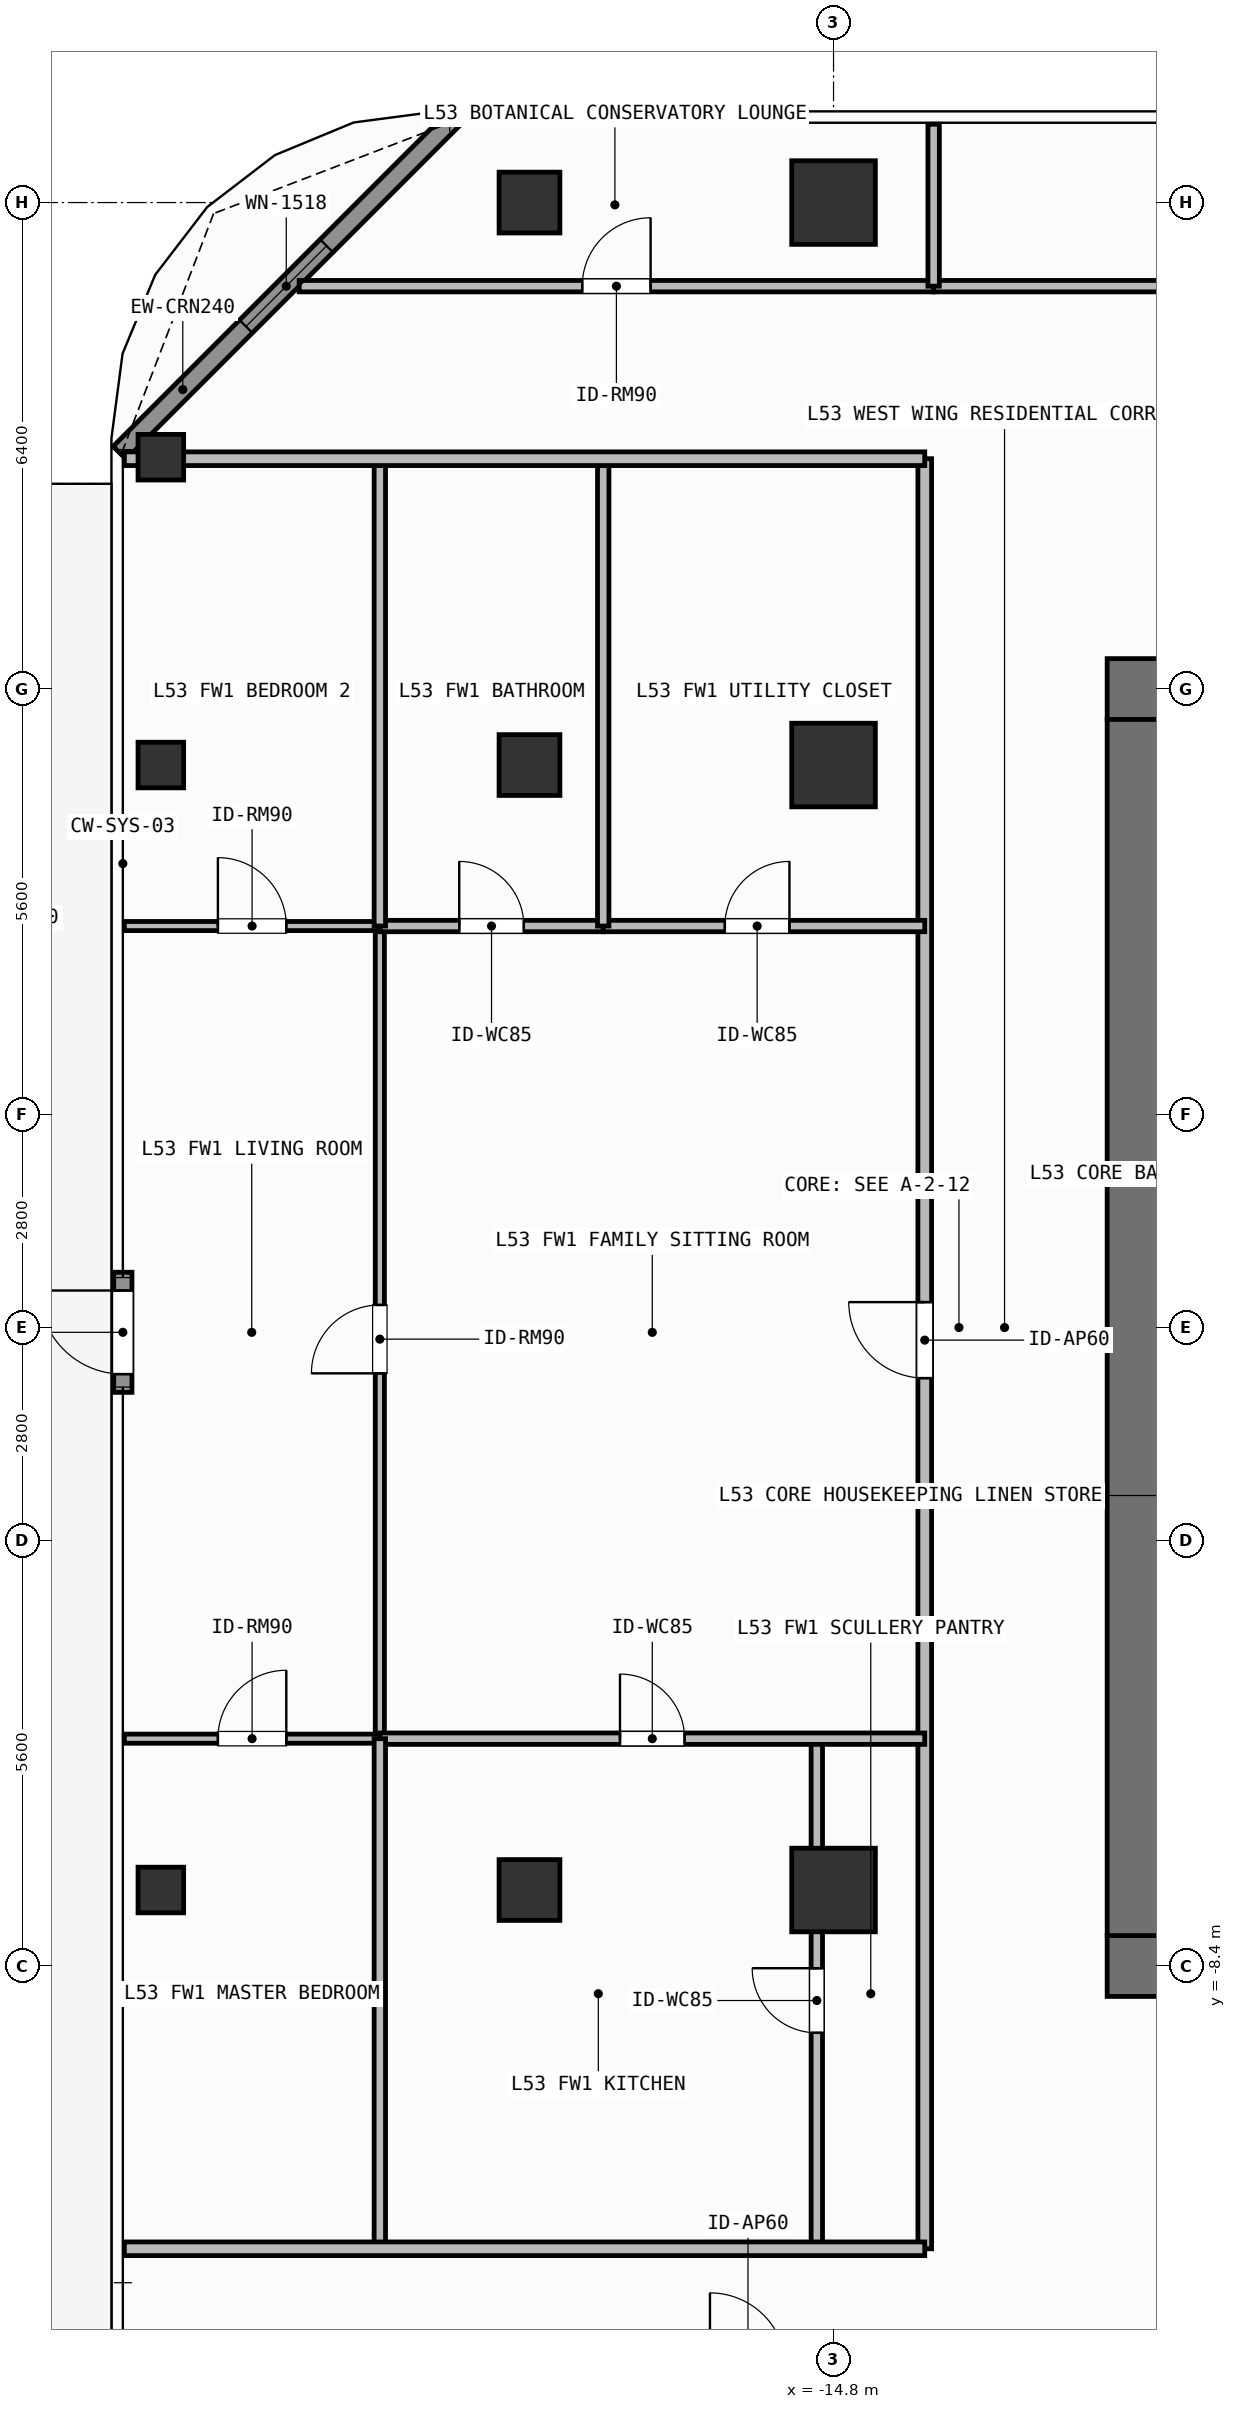
"""IFC4 building model, lengths in metres.
Left out: names, types, materials, properties, quantities, classifications, styles, units other than length and angle.
Written with IfcOpenShell. Run it as: python <this file> out.ifc"""

import sys

from ifc_helpers import new_model, si_unit, direction, frame, frame_2d, origin, origin_2d, place, context, subcontext, project, spatial, rectangle, hollow_rectangle, extrude, element, fill, save


model = new_model("IFC4")
c1 = context("Model", 3, precision=1e-05, world=origin(), true_north=direction((0.0, 1.0)))
c2 = subcontext(c1, "Body", "Model", "MODEL_VIEW")
j1 = project(units=[si_unit("LENGTHUNIT", "METRE"), si_unit("PLANEANGLEUNIT", "RADIAN")], contexts=[c1])
p1 = place(None, origin())
s1 = spatial("IfcSite", under=j1, at=p1, CompositionType="ELEMENT")
p2 = place(p1, origin())
s2 = spatial("IfcBuilding", under=s1, at=p2, CompositionType="ELEMENT")
p3 = place(p2, frame((0.0, 0.0, 215.7)))
s3 = spatial("IfcBuildingStorey", under=s2, at=p3, CompositionType="ELEMENT", Elevation=215.7)
for number, where, z_axis, x_axis in (
    (1, (-11.2, -8.4, 0.0), (0.0, 0.0, 1.0), (1.0, 0.0, 0.0)),
    (2, (-11.2, 8.4, 0.0), (0.0, 0.0, 1.0), (1.0, 0.0, 0.0)),
):
    element("IfcWall", number, at=place(p3, frame(where, z_axis=z_axis, x_axis=x_axis)), inside=s3, PredefinedType="SHEAR", context=c2, shape_type="SweptSolid", body=[
        extrude(rectangle(XDim=1.5, YDim=0.8, at=frame_2d((0.75, 0.0))), origin(), (0.0, 0.0, 1.0), 3.9),
    ])
p4 = place(p3, frame((-10.8, -8.0, 0.0), z_axis=(0.0, 0.0, 1.0), x_axis=(0.0, 1.0, 0.0)))
e3 = element("IfcWall", 3, at=p4, inside=s3, PredefinedType="SHEAR", context=c2, shape_type="SweptSolid", body=[
    extrude(rectangle(XDim=16.0, YDim=0.8, at=frame_2d((8.0, 0.0))), origin(), (0.0, 0.0, 1.0), 3.9),
])
for number, where, z_axis, x_axis in (
    (4, (-14.8, 14.8, 0.0), (0.0, 0.0, 1.0), (1.0, 0.0, 0.0)),
    (5, (-14.8, -7.4, 0.0), (0.0, 0.0, 1.0), (1.0, 0.0, 0.0)),
    (6, (-14.8, 7.4, 0.0), (0.0, 0.0, 1.0), (1.0, 0.0, 0.0)),
):
    element("IfcColumn", number, at=place(p3, frame(where, z_axis=z_axis, x_axis=x_axis)), inside=s3, PredefinedType="COLUMN", context=c2, shape_type="SweptSolid", body=[
        extrude(rectangle(XDim=1.1, YDim=1.1, at=origin_2d()), origin(), (0.0, 0.0, 1.0), 3.9),
    ])
for number, where, z_axis, x_axis in (
    (7, (-18.8, -7.4, 0.0), (0.0, 0.0, 1.0), (1.0, 0.0, 0.0)),
    (8, (-18.8, 7.4, 0.0), (0.0, 0.0, 1.0), (1.0, 0.0, 0.0)),
    (9, (-18.8, 14.8, 0.0), (0.0, 0.0, 1.0), (1.0, 0.0, 0.0)),
):
    element("IfcColumn", number, at=place(p3, frame(where, z_axis=z_axis, x_axis=x_axis)), inside=s3, PredefinedType="COLUMN", context=c2, shape_type="SweptSolid", body=[
        extrude(hollow_rectangle(XDim=0.8, YDim=0.8, WallThickness=0.036, at=origin_2d()), origin(), (0.0, 0.0, 1.0), 3.9),
    ])
for number, where, z_axis, x_axis in (
    (10, (-23.65, 11.45, 0.0), (0.0, 0.0, 1.0), (1.0, 0.0, 0.0)),
    (11, (-23.65, -7.4, 0.0), (0.0, 0.0, 1.0), (1.0, 0.0, 0.0)),
    (12, (-23.65, 7.4, 0.0), (0.0, 0.0, 1.0), (1.0, 0.0, 0.0)),
):
    element("IfcColumn", number, at=place(p3, frame(where, z_axis=z_axis, x_axis=x_axis)), inside=s3, PredefinedType="COLUMN", context=c2, shape_type="SweptSolid", body=[
        extrude(hollow_rectangle(XDim=0.6, YDim=0.6, WallThickness=0.028, at=origin_2d()), origin(), (0.0, 0.0, 1.0), 3.9),
    ])
p5 = place(p3, frame((-24.15, -0.853, 0.0), z_axis=(0.0, 0.0, 1.0), x_axis=(0.0, 1.0, 0.0)))
e13 = element("IfcWall", 13, at=p5, inside=s3, PredefinedType="SOLIDWALL", context=c2, shape_type="SweptSolid", body=[
    extrude(rectangle(XDim=1.58, YDim=0.24, at=frame_2d((0.79, 0.0))), origin(), (0.0, 0.0, 1.0), 3.62),
])
p6 = place(p5, frame((0.24, 0.0, 0.0)))
e14 = element("IfcOpeningElement", 14, at=p6, cuts=e13, PredefinedType="OPENING", context=c2, shape_type="SweptSolid", body=[
    extrude(rectangle(XDim=1.1, YDim=2.2, at=frame_2d((0.55, 1.1))), frame((0.0, 0.13, 0.0), z_axis=(0.0, -1.0, 0.0), x_axis=(1.0, 0.0, 0.0)), (0.0, 0.0, 1.0), 0.26),
])
p7 = place(p3, frame((-24.192, 11.508, 0.0), z_axis=(0.0, 0.0, 1.0), x_axis=(0.707106781187, 0.707106781187, 0.0)))
e15 = element("IfcWall", 15, at=p7, inside=s3, PredefinedType="SOLIDWALL", context=c2, shape_type="SweptSolid", body=[
    extrude(rectangle(XDim=6.201, YDim=0.24, at=frame_2d((3.101, 0.0))), origin(), (0.0, 0.0, 1.0), 3.62),
])
p8 = place(p7, frame((2.351, 0.0, 0.8)))
e16 = element("IfcOpeningElement", 16, at=p8, cuts=e15, PredefinedType="OPENING", context=c2, shape_type="SweptSolid", body=[
    extrude(rectangle(XDim=1.5, YDim=1.85, at=frame_2d((0.75, 0.925))), frame((0.0, 0.13, 0.0), z_axis=(0.0, -1.0, 0.0), x_axis=(1.0, 0.0, 0.0)), (0.0, 0.0, 1.0), 0.26),
])
p9 = place(p3, frame((-21.83, 13.7, 0.0), z_axis=(0.0, 0.0, 1.0), x_axis=(1.0, 0.0, 0.0)))
e17 = element("IfcWall", 17, at=p9, inside=s3, PredefinedType="PARTITIONING", context=c2, shape_type="SweptSolid", body=[
    extrude(rectangle(XDim=8.347, YDim=0.15, at=frame_2d((4.174, 0.0))), origin(), (0.0, 0.0, 1.0), 3.62),
])
p10 = place(p9, frame((3.723, 0.0, 0.0)))
e18 = element("IfcOpeningElement", 18, at=p10, cuts=e17, PredefinedType="OPENING", context=c2, shape_type="SweptSolid", body=[
    extrude(rectangle(XDim=0.9, YDim=2.1, at=frame_2d((0.45, 1.05))), frame((0.0, 0.085, 0.0), z_axis=(0.0, -1.0, 0.0), x_axis=(1.0, 0.0, 0.0)), (0.0, 0.0, 1.0), 0.17),
])
p11 = place(p3, frame((-13.483, 13.7, 0.0), z_axis=(0.0, 0.0, 1.0), x_axis=(1.0, 0.0, 0.0)))
e19 = element("IfcWall", 19, at=p11, inside=s3, PredefinedType="PARTITIONING", context=c2, shape_type="SweptSolid", body=[
    extrude(rectangle(XDim=13.58, YDim=0.15, at=frame_2d((6.79, 0.0))), origin(), (0.0, 0.0, 1.0), 3.62),
])
p12 = place(p11, frame((6.788, 0.0, 0.0)))
e20 = element("IfcOpeningElement", 20, at=p12, cuts=e19, PredefinedType="OPENING", context=c2, shape_type="SweptSolid", body=[
    extrude(rectangle(XDim=0.9, YDim=2.1, at=frame_2d((0.45, 1.05))), frame((0.0, 0.085, 0.0), z_axis=(0.0, -1.0, 0.0), x_axis=(1.0, 0.0, 0.0)), (0.0, 0.0, 1.0), 0.17),
])
p13 = place(p3, frame((-13.6, -12.12, 0.0), z_axis=(0.0, 0.0, 1.0), x_axis=(0.0, 1.0, 0.0)))
e21 = element("IfcWall", 21, at=p13, inside=s3, PredefinedType="PARTITIONING", context=c2, shape_type="SweptSolid", body=[
    extrude(rectangle(XDim=23.55, YDim=0.18, at=frame_2d((11.775, 0.0))), origin(), (0.0, 0.0, 1.0), 3.62),
])
p14 = place(p13, frame((11.454, 0.0, 0.0)))
e22 = element("IfcOpeningElement", 22, at=p14, cuts=e21, PredefinedType="OPENING", context=c2, shape_type="SweptSolid", body=[
    extrude(rectangle(XDim=1.0, YDim=2.2, at=frame_2d((0.5, 1.1))), frame((0.0, 0.1, 0.0), z_axis=(0.0, -1.0, 0.0), x_axis=(1.0, 0.0, 0.0)), (0.0, 0.0, 1.0), 0.2),
])
p15 = place(p3, frame((-20.769, -5.409, 0.0), z_axis=(0.0, 0.0, 1.0), x_axis=(0.0, 1.0, 0.0)))
e23 = element("IfcWall", 23, at=p15, inside=s3, PredefinedType="PARTITIONING", context=c2, shape_type="SweptSolid", body=[
    extrude(rectangle(XDim=10.691, YDim=0.12, at=frame_2d((5.345, 0.0))), origin(), (0.0, 0.0, 1.0), 3.62),
])
p16 = place(p15, frame((4.806, 0.0, 0.0)))
e24 = element("IfcOpeningElement", 24, at=p16, cuts=e23, PredefinedType="OPENING", context=c2, shape_type="SweptSolid", body=[
    extrude(rectangle(XDim=0.9, YDim=2.1, at=frame_2d((0.45, 1.05))), frame((0.0, 0.07, 0.0), z_axis=(0.0, -1.0, 0.0), x_axis=(1.0, 0.0, 0.0)), (0.0, 0.0, 1.0), 0.14),
])
p17 = place(p3, frame((-15.02, -12.12, 0.0), z_axis=(0.0, 0.0, 1.0), x_axis=(0.0, 1.0, 0.0)))
e25 = element("IfcWall", 25, at=p17, inside=s3, PredefinedType="PARTITIONING", context=c2, shape_type="SweptSolid", body=[
    extrude(rectangle(XDim=6.711, YDim=0.15, at=frame_2d((3.355, 0.0))), origin(), (0.0, 0.0, 1.0), 3.62),
])
p18 = place(p17, frame((2.841, 0.0, 0.0)))
e26 = element("IfcOpeningElement", 26, at=p18, cuts=e25, PredefinedType="OPENING", context=c2, shape_type="SweptSolid", body=[
    extrude(rectangle(XDim=0.85, YDim=2.1, at=frame_2d((0.425, 1.05))), frame((0.0, 0.085, 0.0), z_axis=(0.0, -1.0, 0.0), x_axis=(1.0, 0.0, 0.0)), (0.0, 0.0, 1.0), 0.17),
])
p19 = place(p3, frame((-20.769, 5.282, 0.0), z_axis=(0.0, 0.0, 1.0), x_axis=(1.0, 0.0, 0.0)))
e27 = element("IfcWall", 27, at=p19, inside=s3, PredefinedType="PARTITIONING", context=c2, shape_type="SweptSolid", body=[
    extrude(rectangle(XDim=2.939, YDim=0.15, at=frame_2d((1.469, 0.0))), origin(), (0.0, 0.0, 1.0), 3.62),
])
p20 = place(p19, frame((1.044, 0.0, 0.0)))
e28 = element("IfcOpeningElement", 28, at=p20, cuts=e27, PredefinedType="OPENING", context=c2, shape_type="SweptSolid", body=[
    extrude(rectangle(XDim=0.85, YDim=2.1, at=frame_2d((0.425, 1.05))), frame((0.0, 0.085, 0.0), z_axis=(0.0, -1.0, 0.0), x_axis=(1.0, 0.0, 0.0)), (0.0, 0.0, 1.0), 0.17),
])
p21 = place(p3, frame((-17.83, 5.282, 0.0), z_axis=(0.0, 0.0, 1.0), x_axis=(1.0, 0.0, 0.0)))
e29 = element("IfcWall", 29, at=p21, inside=s3, PredefinedType="PARTITIONING", context=c2, shape_type="SweptSolid", body=[
    extrude(rectangle(XDim=4.23, YDim=0.15, at=frame_2d((2.115, 0.0))), origin(), (0.0, 0.0, 1.0), 3.62),
])
p22 = place(p21, frame((1.6, 0.0, 0.0)))
e30 = element("IfcOpeningElement", 30, at=p22, cuts=e29, PredefinedType="OPENING", context=c2, shape_type="SweptSolid", body=[
    extrude(rectangle(XDim=0.85, YDim=2.1, at=frame_2d((0.425, 1.05))), frame((0.0, 0.085, 0.0), z_axis=(0.0, -1.0, 0.0), x_axis=(1.0, 0.0, 0.0)), (0.0, 0.0, 1.0), 0.17),
])
p23 = place(p3, frame((-20.769, -5.409, 0.0), z_axis=(0.0, 0.0, 1.0), x_axis=(1.0, 0.0, 0.0)))
e31 = element("IfcWall", 31, at=p23, inside=s3, PredefinedType="PARTITIONING", context=c2, shape_type="SweptSolid", body=[
    extrude(rectangle(XDim=7.169, YDim=0.15, at=frame_2d((3.584, 0.0))), origin(), (0.0, 0.0, 1.0), 3.62),
])
p24 = place(p23, frame((3.159, 0.0, 0.0)))
e32 = element("IfcOpeningElement", 32, at=p24, cuts=e31, PredefinedType="OPENING", context=c2, shape_type="SweptSolid", body=[
    extrude(rectangle(XDim=0.85, YDim=2.1, at=frame_2d((0.425, 1.05))), frame((0.0, 0.085, 0.0), z_axis=(0.0, -1.0, 0.0), x_axis=(1.0, 0.0, 0.0)), (0.0, 0.0, 1.0), 0.17),
])
p25 = place(p3, frame((-24.13, -5.409, 0.0), z_axis=(0.0, 0.0, 1.0), x_axis=(1.0, 0.0, 0.0)))
e33 = element("IfcWall", 33, at=p25, inside=s3, PredefinedType="PARTITIONING", context=c2, shape_type="SweptSolid", body=[
    extrude(rectangle(XDim=3.361, YDim=0.12, at=frame_2d((1.68, 0.0))), origin(), (0.0, 0.0, 1.0), 3.62),
])
p26 = place(p25, frame((1.23, 0.0, 0.0)))
e34 = element("IfcOpeningElement", 34, at=p26, cuts=e33, PredefinedType="OPENING", context=c2, shape_type="SweptSolid", body=[
    extrude(rectangle(XDim=0.9, YDim=2.1, at=frame_2d((0.45, 1.05))), frame((0.0, 0.07, 0.0), z_axis=(0.0, -1.0, 0.0), x_axis=(1.0, 0.0, 0.0)), (0.0, 0.0, 1.0), 0.14),
])
p27 = place(p3, frame((-24.13, 5.282, 0.0), z_axis=(0.0, 0.0, 1.0), x_axis=(1.0, 0.0, 0.0)))
e35 = element("IfcWall", 35, at=p27, inside=s3, PredefinedType="PARTITIONING", context=c2, shape_type="SweptSolid", body=[
    extrude(rectangle(XDim=3.361, YDim=0.12, at=frame_2d((1.68, 0.0))), origin(), (0.0, 0.0, 1.0), 3.62),
])
p28 = place(p27, frame((1.23, 0.0, 0.0)))
e36 = element("IfcOpeningElement", 36, at=p28, cuts=e35, PredefinedType="OPENING", context=c2, shape_type="SweptSolid", body=[
    extrude(rectangle(XDim=0.9, YDim=2.1, at=frame_2d((0.45, 1.05))), frame((0.0, 0.07, 0.0), z_axis=(0.0, -1.0, 0.0), x_axis=(1.0, 0.0, 0.0)), (0.0, 0.0, 1.0), 0.14),
])
p29 = place(p3, frame((-13.483, 13.7, 0.0), z_axis=(0.0, 0.0, 1.0), x_axis=(0.0, 1.0, 0.0)))
e37 = element("IfcWall", 37, at=p29, inside=s3, PredefinedType="PARTITIONING", context=c2, shape_type="SweptSolid", body=[
    extrude(rectangle(XDim=2.13, YDim=0.15, at=frame_2d((1.065, 0.0))), origin(), (0.0, 0.0, 1.0), 3.62),
])
p30 = place(p3, frame((-17.83, 5.282, 0.0), z_axis=(0.0, 0.0, 1.0), x_axis=(0.0, 1.0, 0.0)))
e38 = element("IfcWall", 38, at=p30, inside=s3, PredefinedType="PARTITIONING", context=c2, shape_type="SweptSolid", body=[
    extrude(rectangle(XDim=6.148, YDim=0.15, at=frame_2d((3.074, 0.0))), origin(), (0.0, 0.0, 1.0), 3.21),
])
p31 = place(p3, frame((-20.769, -12.12, 0.0), z_axis=(0.0, 0.0, 1.0), x_axis=(0.0, 1.0, 0.0)))
e39 = element("IfcWall", 39, at=p31, inside=s3, PredefinedType="PARTITIONING", context=c2, shape_type="SweptSolid", body=[
    extrude(rectangle(XDim=6.711, YDim=0.15, at=frame_2d((3.355, 0.0))), origin(), (0.0, 0.0, 1.0), 3.62),
])
p32 = place(p3, frame((-20.769, 5.282, 0.0), z_axis=(0.0, 0.0, 1.0), x_axis=(0.0, 1.0, 0.0)))
e40 = element("IfcWall", 40, at=p32, inside=s3, PredefinedType="PARTITIONING", context=c2, shape_type="SweptSolid", body=[
    extrude(rectangle(XDim=6.148, YDim=0.15, at=frame_2d((3.074, 0.0))), origin(), (0.0, 0.0, 1.0), 3.62),
])
for number, where, z_axis, x_axis in (
    (41, (-24.13, -12.12, 0.0), (0.0, 0.0, 1.0), (1.0, 0.0, 0.0)),
    (42, (-24.13, 11.43, 0.0), (0.0, 0.0, 1.0), (1.0, 0.0, 0.0)),
):
    element("IfcWall", number, at=place(p3, frame(where, z_axis=z_axis, x_axis=x_axis)), inside=s3, PredefinedType="PARTITIONING", context=c2, shape_type="SweptSolid", body=[
        extrude(rectangle(XDim=10.53, YDim=0.18, at=frame_2d((5.265, 0.0))), origin(), (0.0, 0.0, 1.0), 3.62),
    ])
p33 = place(p6, origin())
e43 = element("IfcDoor", 43, at=p33, inside=s3, OperationType="SINGLE_SWING_RIGHT", PredefinedType="DOOR", context=c2, shape_type="SweptSolid", body=[
    extrude(rectangle(XDim=1.1, YDim=2.2, at=frame_2d((0.55, 1.1))), frame((0.0, 0.025, 0.0), z_axis=(0.0, -1.0, 0.0), x_axis=(1.0, 0.0, 0.0)), (0.0, 0.0, 1.0), 0.05),
])
fill(e14, e43)
p34 = place(p8, origin())
e44 = element("IfcWindow", 44, at=p34, inside=s3, PartitioningType="SINGLE_PANEL", PredefinedType="WINDOW", context=c2, shape_type="SweptSolid", body=[
    extrude(rectangle(XDim=1.5, YDim=1.85, at=frame_2d((0.75, 0.925))), frame((0.0, 0.03, 0.0), z_axis=(0.0, -1.0, 0.0), x_axis=(1.0, 0.0, 0.0)), (0.0, 0.0, 1.0), 0.06),
])
fill(e16, e44)
p35 = place(p10, origin())
e45 = element("IfcDoor", 45, at=p35, inside=s3, OperationType="SINGLE_SWING_RIGHT", PredefinedType="DOOR", context=c2, shape_type="SweptSolid", body=[
    extrude(rectangle(XDim=0.9, YDim=2.1, at=frame_2d((0.45, 1.05))), frame((0.0, 0.025, 0.0), z_axis=(0.0, -1.0, 0.0), x_axis=(1.0, 0.0, 0.0)), (0.0, 0.0, 1.0), 0.05),
])
fill(e18, e45)
p36 = place(p14, origin())
e46 = element("IfcDoor", 46, at=p36, inside=s3, OperationType="SINGLE_SWING_RIGHT", PredefinedType="DOOR", context=c2, shape_type="SweptSolid", body=[
    extrude(rectangle(XDim=1.0, YDim=2.2, at=frame_2d((0.5, 1.1))), frame((0.0, 0.025, 0.0), z_axis=(0.0, -1.0, 0.0), x_axis=(1.0, 0.0, 0.0)), (0.0, 0.0, 1.0), 0.05),
])
fill(e22, e46)
p37 = place(p16, origin())
e47 = element("IfcDoor", 47, at=p37, inside=s3, OperationType="SINGLE_SWING_LEFT", PredefinedType="DOOR", context=c2, shape_type="SweptSolid", body=[
    extrude(rectangle(XDim=0.9, YDim=2.1, at=frame_2d((0.45, 1.05))), frame((0.0, 0.025, 0.0), z_axis=(0.0, -1.0, 0.0), x_axis=(1.0, 0.0, 0.0)), (0.0, 0.0, 1.0), 0.05),
])
fill(e24, e47)
p38 = place(p18, origin())
e48 = element("IfcDoor", 48, at=p38, inside=s3, OperationType="SINGLE_SWING_RIGHT", PredefinedType="DOOR", context=c2, shape_type="SweptSolid", body=[
    extrude(rectangle(XDim=0.85, YDim=2.1, at=frame_2d((0.425, 1.05))), frame((0.0, 0.025, 0.0), z_axis=(0.0, -1.0, 0.0), x_axis=(1.0, 0.0, 0.0)), (0.0, 0.0, 1.0), 0.05),
])
fill(e26, e48)
p39 = place(p20, origin())
e49 = element("IfcDoor", 49, at=p39, inside=s3, OperationType="SINGLE_SWING_LEFT", PredefinedType="DOOR", context=c2, shape_type="SweptSolid", body=[
    extrude(rectangle(XDim=0.85, YDim=2.1, at=frame_2d((0.425, 1.05))), frame((0.0, 0.025, 0.0), z_axis=(0.0, -1.0, 0.0), x_axis=(1.0, 0.0, 0.0)), (0.0, 0.0, 1.0), 0.05),
])
fill(e28, e49)
p40 = place(p22, origin())
e50 = element("IfcDoor", 50, at=p40, inside=s3, OperationType="SINGLE_SWING_RIGHT", PredefinedType="DOOR", context=c2, shape_type="SweptSolid", body=[
    extrude(rectangle(XDim=0.85, YDim=2.1, at=frame_2d((0.425, 1.05))), frame((0.0, 0.025, 0.0), z_axis=(0.0, -1.0, 0.0), x_axis=(1.0, 0.0, 0.0)), (0.0, 0.0, 1.0), 0.05),
])
fill(e30, e50)
p41 = place(p24, origin())
e51 = element("IfcDoor", 51, at=p41, inside=s3, OperationType="SINGLE_SWING_LEFT", PredefinedType="DOOR", context=c2, shape_type="SweptSolid", body=[
    extrude(rectangle(XDim=0.85, YDim=2.1, at=frame_2d((0.425, 1.05))), frame((0.0, 0.025, 0.0), z_axis=(0.0, -1.0, 0.0), x_axis=(1.0, 0.0, 0.0)), (0.0, 0.0, 1.0), 0.05),
])
fill(e32, e51)
p42 = place(p26, origin())
e52 = element("IfcDoor", 52, at=p42, inside=s3, OperationType="SINGLE_SWING_RIGHT", PredefinedType="DOOR", context=c2, shape_type="SweptSolid", body=[
    extrude(rectangle(XDim=0.9, YDim=2.1, at=frame_2d((0.45, 1.05))), frame((0.0, 0.025, 0.0), z_axis=(0.0, -1.0, 0.0), x_axis=(1.0, 0.0, 0.0)), (0.0, 0.0, 1.0), 0.05),
])
fill(e34, e52)
p43 = place(p28, origin())
e53 = element("IfcDoor", 53, at=p43, inside=s3, OperationType="SINGLE_SWING_LEFT", PredefinedType="DOOR", context=c2, shape_type="SweptSolid", body=[
    extrude(rectangle(XDim=0.9, YDim=2.1, at=frame_2d((0.45, 1.05))), frame((0.0, 0.025, 0.0), z_axis=(0.0, -1.0, 0.0), x_axis=(1.0, 0.0, 0.0)), (0.0, 0.0, 1.0), 0.05),
])
fill(e36, e53)
save(model, sys.argv[1])
